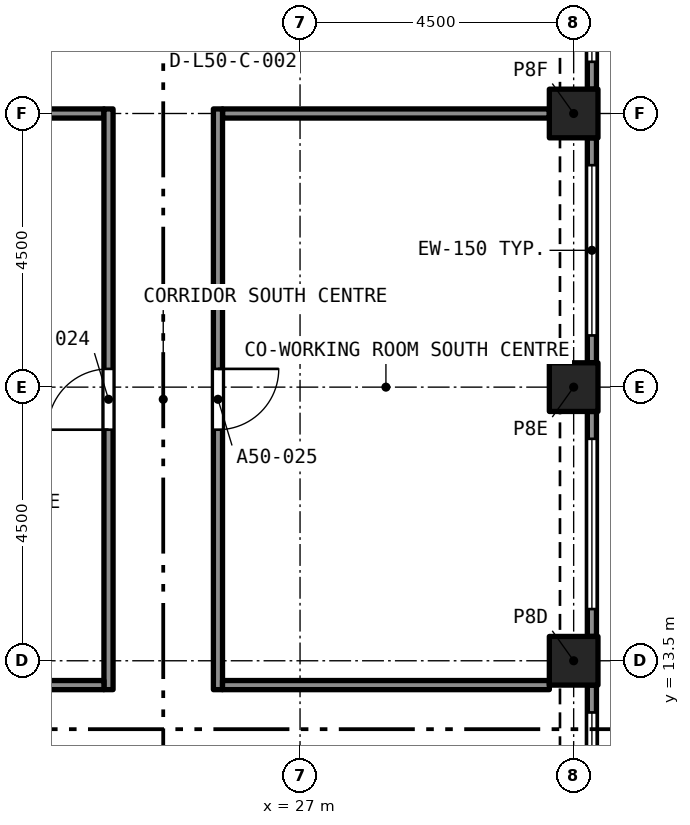
"""IFC4 building model, lengths in metres.
Left out: names, types, materials, properties, quantities, classifications, styles, units other than length and angle.
Written with IfcOpenShell. Run it as: python <this file> out.ifc"""

import sys

from ifc_helpers import new_model, si_unit, direction, frame, frame_2d, origin, origin_2d, place, context, subcontext, project, spatial, rectangle, extrude, element, fill, save


model = new_model("IFC4")
c1 = context("Model", 3, precision=1e-05, world=origin(), true_north=direction((0.0, 1.0)))
c2 = subcontext(c1, "Body", "Model", "MODEL_VIEW")
j1 = project(units=[si_unit("LENGTHUNIT", "METRE"), si_unit("PLANEANGLEUNIT", "RADIAN")], contexts=[c1])
p1 = place(None, origin())
s1 = spatial("IfcSite", under=j1, at=p1, CompositionType="ELEMENT")
p2 = place(p1, origin())
s2 = spatial("IfcBuilding", under=s1, at=p2, CompositionType="ELEMENT")
p3 = place(p2, frame((0.0, 0.0, 182.7)))
s3 = spatial("IfcBuildingStorey", under=s2, at=p3, CompositionType="ELEMENT", Elevation=182.7)
for number, where, z_axis, x_axis in (
    (1, (31.5, 13.5, 0.0), (0.0, 0.0, 1.0), (1.0, 0.0, 0.0)),
    (2, (31.5, 18.0, 0.0), (0.0, 0.0, 1.0), (1.0, 0.0, 0.0)),
    (3, (31.5, 22.5, 0.0), (0.0, 0.0, 1.0), (1.0, 0.0, 0.0)),
):
    element("IfcColumn", number, at=place(p3, frame(where, z_axis=z_axis, x_axis=x_axis)), inside=s3, PredefinedType="COLUMN", context=c2, shape_type="SweptSolid", body=[
        extrude(rectangle(XDim=0.8, YDim=0.8, at=origin_2d()), origin(), (0.0, 0.0, 1.0), 3.2),
    ])
p4 = place(p3, frame((31.8, 13.1, 0.0), z_axis=(0.0, 0.0, 1.0), x_axis=(0.0, -1.0, 0.0)))
e4 = element("IfcWall", 4, at=p4, inside=s3, PredefinedType="SOLIDWALL", context=c2, shape_type="SweptSolid", body=[
    extrude(rectangle(XDim=3.7, YDim=0.15, at=frame_2d((1.85, 0.0))), origin(), (0.0, 0.0, 1.0), 3.2),
])
p5 = place(p4, frame((0.45, 0.0, 0.45)))
e5 = element("IfcOpeningElement", 5, at=p5, cuts=e4, PredefinedType="OPENING", context=c2, shape_type="SweptSolid", body=[
    extrude(rectangle(XDim=2.8, YDim=1.95, at=frame_2d((1.4, 0.975))), frame((0.0, 0.085, 0.0), z_axis=(0.0, -1.0, 0.0), x_axis=(1.0, 0.0, 0.0)), (0.0, 0.0, 1.0), 0.17),
])
p6 = place(p3, frame((31.8, 17.6, 0.0), z_axis=(0.0, 0.0, 1.0), x_axis=(0.0, -1.0, 0.0)))
e6 = element("IfcWall", 6, at=p6, inside=s3, PredefinedType="SOLIDWALL", context=c2, shape_type="SweptSolid", body=[
    extrude(rectangle(XDim=3.7, YDim=0.15, at=frame_2d((1.85, 0.0))), origin(), (0.0, 0.0, 1.0), 3.2),
])
p7 = place(p6, frame((0.45, 0.0, 0.45)))
e7 = element("IfcOpeningElement", 7, at=p7, cuts=e6, PredefinedType="OPENING", context=c2, shape_type="SweptSolid", body=[
    extrude(rectangle(XDim=2.8, YDim=1.95, at=frame_2d((1.4, 0.975))), frame((0.0, 0.085, 0.0), z_axis=(0.0, -1.0, 0.0), x_axis=(1.0, 0.0, 0.0)), (0.0, 0.0, 1.0), 0.17),
])
p8 = place(p3, frame((31.8, 22.1, 0.0), z_axis=(0.0, 0.0, 1.0), x_axis=(0.0, -1.0, 0.0)))
e8 = element("IfcWall", 8, at=p8, inside=s3, PredefinedType="SOLIDWALL", context=c2, shape_type="SweptSolid", body=[
    extrude(rectangle(XDim=3.7, YDim=0.15, at=frame_2d((1.85, 0.0))), origin(), (0.0, 0.0, 1.0), 3.2),
])
p9 = place(p8, frame((0.45, 0.0, 0.45)))
e9 = element("IfcOpeningElement", 9, at=p9, cuts=e8, PredefinedType="OPENING", context=c2, shape_type="SweptSolid", body=[
    extrude(rectangle(XDim=2.8, YDim=1.95, at=frame_2d((1.4, 0.975))), frame((0.0, 0.085, 0.0), z_axis=(0.0, -1.0, 0.0), x_axis=(1.0, 0.0, 0.0)), (0.0, 0.0, 1.0), 0.17),
])
p10 = place(p3, frame((31.8, 26.6, 0.0), z_axis=(0.0, 0.0, 1.0), x_axis=(0.0, -1.0, 0.0)))
e10 = element("IfcWall", 10, at=p10, inside=s3, PredefinedType="SOLIDWALL", context=c2, shape_type="SweptSolid", body=[
    extrude(rectangle(XDim=3.7, YDim=0.15, at=frame_2d((1.85, 0.0))), origin(), (0.0, 0.0, 1.0), 3.2),
])
p11 = place(p10, frame((0.45, 0.0, 0.45)))
e11 = element("IfcOpeningElement", 11, at=p11, cuts=e10, PredefinedType="OPENING", context=c2, shape_type="SweptSolid", body=[
    extrude(rectangle(XDim=2.8, YDim=1.95, at=frame_2d((1.4, 0.975))), frame((0.0, 0.085, 0.0), z_axis=(0.0, -1.0, 0.0), x_axis=(1.0, 0.0, 0.0)), (0.0, 0.0, 1.0), 0.17),
])
for number, where, z_axis, x_axis in (
    (12, (18.4, 22.5, 0.0), (0.0, 0.0, 1.0), (1.0, 0.0, 0.0)),
    (13, (25.725, 22.5, 0.0), (0.0, 0.0, 1.0), (1.0, 0.0, 0.0)),
):
    element("IfcWall", number, at=place(p3, frame(where, z_axis=z_axis, x_axis=x_axis)), inside=s3, PredefinedType="PARTITIONING", context=c2, shape_type="SweptSolid", body=[
        extrude(rectangle(XDim=5.375, YDim=0.15, at=frame_2d((2.688, 0.0))), origin(), (0.0, 0.0, 1.0), 2.75),
    ])
p12 = place(p3, frame((23.85, 13.025, 0.0), z_axis=(0.0, 0.0, 1.0), x_axis=(0.0, 1.0, 0.0)))
e14 = element("IfcWall", 14, at=p12, inside=s3, PredefinedType="PARTITIONING", context=c2, shape_type="SweptSolid", body=[
    extrude(rectangle(XDim=9.55, YDim=0.15, at=frame_2d((4.775, 0.0))), origin(), (0.0, 0.0, 1.0), 2.75),
])
p13 = place(p12, frame((4.275, 0.0, 0.0)))
e15 = element("IfcOpeningElement", 15, at=p13, cuts=e14, PredefinedType="OPENING", context=c2, shape_type="SweptSolid", body=[
    extrude(rectangle(XDim=1.0, YDim=2.1, at=frame_2d((0.5, 1.05))), frame((0.0, 0.085, 0.0), z_axis=(0.0, -1.0, 0.0), x_axis=(1.0, 0.0, 0.0)), (0.0, 0.0, 1.0), 0.17),
])
p14 = place(p3, frame((25.65, 22.575, 0.0), z_axis=(0.0, 0.0, 1.0), x_axis=(0.0, -1.0, 0.0)))
e16 = element("IfcWall", 16, at=p14, inside=s3, PredefinedType="PARTITIONING", context=c2, shape_type="SweptSolid", body=[
    extrude(rectangle(XDim=9.55, YDim=0.15, at=frame_2d((4.775, 0.0))), origin(), (0.0, 0.0, 1.0), 2.75),
])
p15 = place(p14, frame((4.275, 0.0, 0.0)))
e17 = element("IfcOpeningElement", 17, at=p15, cuts=e16, PredefinedType="OPENING", context=c2, shape_type="SweptSolid", body=[
    extrude(rectangle(XDim=1.0, YDim=2.1, at=frame_2d((0.5, 1.05))), frame((0.0, 0.085, 0.0), z_axis=(0.0, -1.0, 0.0), x_axis=(1.0, 0.0, 0.0)), (0.0, 0.0, 1.0), 0.17),
])
for number, where, z_axis, x_axis in (
    (18, (18.4, 13.1, 0.0), (0.0, 0.0, 1.0), (1.0, 0.0, 0.0)),
    (19, (25.725, 13.1, 0.0), (0.0, 0.0, 1.0), (1.0, 0.0, 0.0)),
):
    element("IfcWall", number, at=place(p3, frame(where, z_axis=z_axis, x_axis=x_axis)), inside=s3, PredefinedType="PARTITIONING", context=c2, shape_type="SweptSolid", body=[
        extrude(rectangle(XDim=5.375, YDim=0.15, at=frame_2d((2.688, 0.0))), origin(), (0.0, 0.0, 1.0), 2.75),
    ])
p16 = place(p5, origin())
e20 = element("IfcWindow", 20, at=p16, inside=s3, PartitioningType="SINGLE_PANEL", PredefinedType="WINDOW", context=c2, shape_type="SweptSolid", body=[
    extrude(rectangle(XDim=2.8, YDim=1.95, at=frame_2d((1.4, 0.975))), frame((0.0, 0.03, 0.0), z_axis=(0.0, -1.0, 0.0), x_axis=(1.0, 0.0, 0.0)), (0.0, 0.0, 1.0), 0.06),
])
fill(e5, e20)
p17 = place(p7, origin())
e21 = element("IfcWindow", 21, at=p17, inside=s3, PartitioningType="SINGLE_PANEL", PredefinedType="WINDOW", context=c2, shape_type="SweptSolid", body=[
    extrude(rectangle(XDim=2.8, YDim=1.95, at=frame_2d((1.4, 0.975))), frame((0.0, 0.03, 0.0), z_axis=(0.0, -1.0, 0.0), x_axis=(1.0, 0.0, 0.0)), (0.0, 0.0, 1.0), 0.06),
])
fill(e7, e21)
p18 = place(p9, origin())
e22 = element("IfcWindow", 22, at=p18, inside=s3, PartitioningType="SINGLE_PANEL", PredefinedType="WINDOW", context=c2, shape_type="SweptSolid", body=[
    extrude(rectangle(XDim=2.8, YDim=1.95, at=frame_2d((1.4, 0.975))), frame((0.0, 0.03, 0.0), z_axis=(0.0, -1.0, 0.0), x_axis=(1.0, 0.0, 0.0)), (0.0, 0.0, 1.0), 0.06),
])
fill(e9, e22)
p19 = place(p11, origin())
e23 = element("IfcWindow", 23, at=p19, inside=s3, PartitioningType="SINGLE_PANEL", PredefinedType="WINDOW", context=c2, shape_type="SweptSolid", body=[
    extrude(rectangle(XDim=2.8, YDim=1.95, at=frame_2d((1.4, 0.975))), frame((0.0, 0.03, 0.0), z_axis=(0.0, -1.0, 0.0), x_axis=(1.0, 0.0, 0.0)), (0.0, 0.0, 1.0), 0.06),
])
fill(e11, e23)
p20 = place(p13, origin())
e24 = element("IfcDoor", 24, at=p20, inside=s3, OperationType="SINGLE_SWING_RIGHT", PredefinedType="DOOR", context=c2, shape_type="SweptSolid", body=[
    extrude(rectangle(XDim=1.0, YDim=2.1, at=frame_2d((0.5, 1.05))), frame((0.0, 0.025, 0.0), z_axis=(0.0, -1.0, 0.0), x_axis=(1.0, 0.0, 0.0)), (0.0, 0.0, 1.0), 0.05),
])
fill(e15, e24)
p21 = place(p15, origin())
e25 = element("IfcDoor", 25, at=p21, inside=s3, OperationType="SINGLE_SWING_LEFT", PredefinedType="DOOR", context=c2, shape_type="SweptSolid", body=[
    extrude(rectangle(XDim=1.0, YDim=2.1, at=frame_2d((0.5, 1.05))), frame((0.0, 0.025, 0.0), z_axis=(0.0, -1.0, 0.0), x_axis=(1.0, 0.0, 0.0)), (0.0, 0.0, 1.0), 0.05),
])
fill(e17, e25)
save(model, sys.argv[1])
